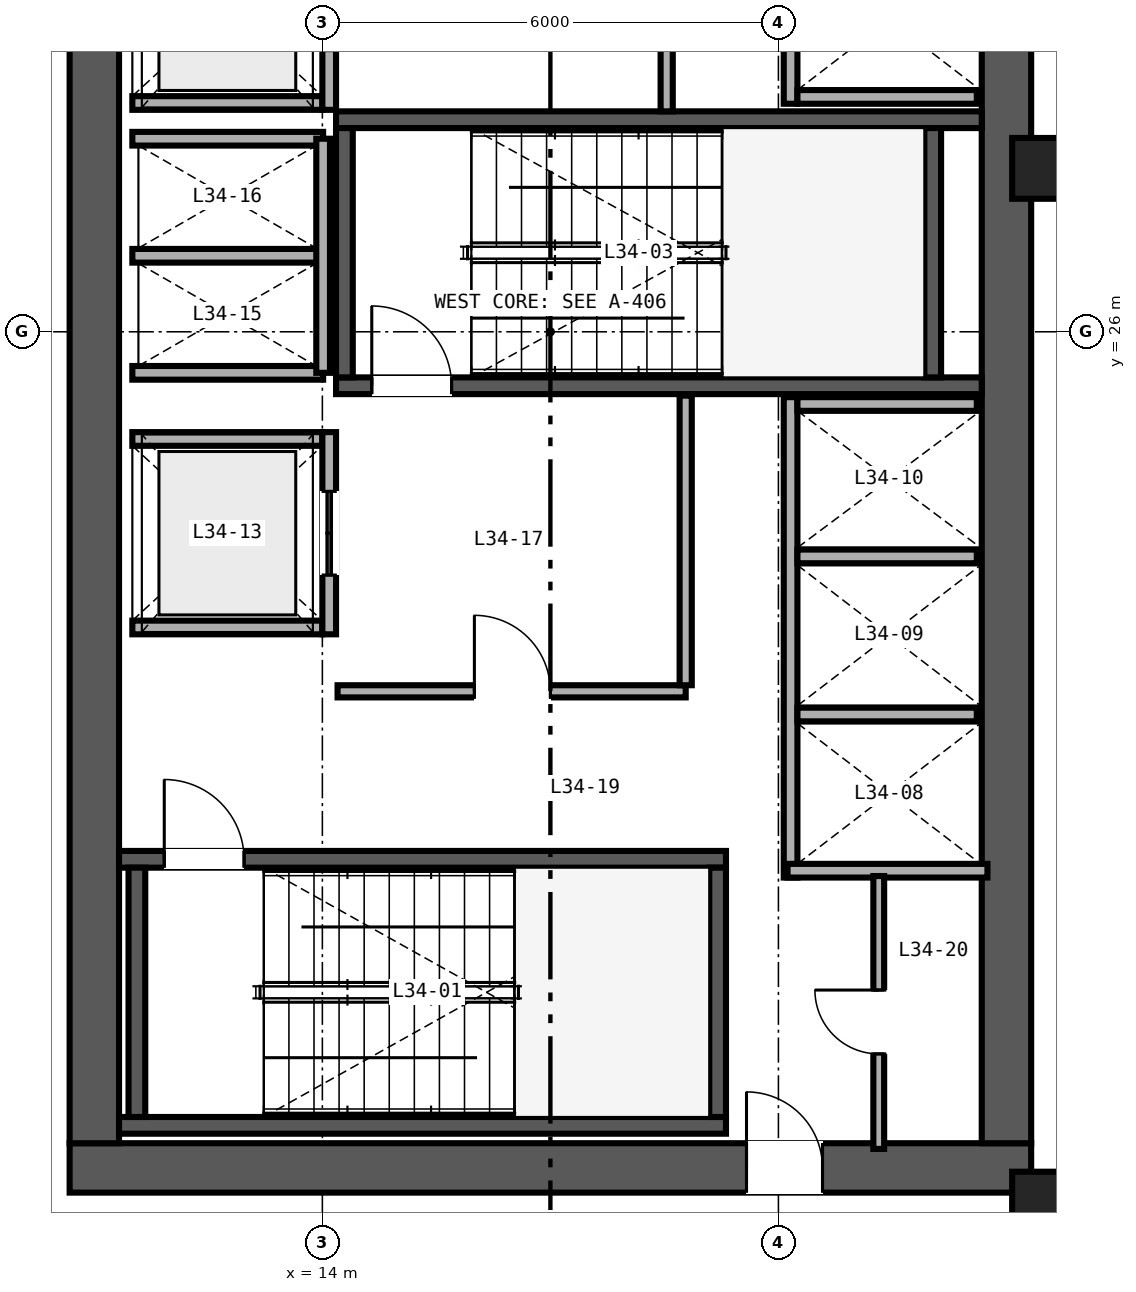
"""IFC4 building model, lengths in metres.
Left out: names, types, materials, properties, quantities, classifications, styles, units other than length and angle.
Written with IfcOpenShell. Run it as: python <this file> out.ifc"""

import sys

from ifc_helpers import new_model, si_unit, direction, frame, frame_2d, origin, origin_2d, place, context, subcontext, project, spatial, rectangle, hollow_rectangle, extrude, source, transform, mapped, element, fill, save


model = new_model("IFC4")
c1 = context("Model", 3, precision=1e-05, world=origin(), true_north=direction((0.0, 1.0)))
c2 = subcontext(c1, "Body", "Model", "MODEL_VIEW")
j1 = project(units=[si_unit("LENGTHUNIT", "METRE"), si_unit("PLANEANGLEUNIT", "RADIAN")], contexts=[c1])
p1 = place(None, origin())
s1 = spatial("IfcSite", under=j1, at=p1, CompositionType="ELEMENT")
p2 = place(p1, origin())
s2 = spatial("IfcBuilding", under=s1, at=p2, CompositionType="ELEMENT")
p3 = place(p2, frame((0.0, 0.0, 136.8)))
s3 = spatial("IfcBuildingStorey", under=s2, at=p3, CompositionType="ELEMENT", Elevation=136.8)
p4 = place(p3, frame((10.675, 15.0, 0.0), z_axis=(0.0, 0.0, 1.0), x_axis=(1.0, 0.0, 0.0)))
e1 = element("IfcWall", 1, at=p4, inside=s3, PredefinedType="SHEAR", context=c2, shape_type="SweptSolid", body=[
    extrude(rectangle(XDim=12.65, YDim=0.65, at=frame_2d((6.325, 0.0))), origin(), (0.0, 0.0, 1.0), 3.36),
])
p5 = place(p4, frame((8.905, 0.0, 0.0)))
e2 = element("IfcOpeningElement", 2, at=p5, cuts=e1, PredefinedType="OPENING", context=c2, shape_type="SweptSolid", body=[
    extrude(rectangle(XDim=1.0, YDim=2.15, at=frame_2d((0.5, 1.075))), frame((0.0, 0.335, 0.0), z_axis=(0.0, -1.0, 0.0), x_axis=(1.0, 0.0, 0.0)), (0.0, 0.0, 1.0), 0.67),
])
for number, where, z_axis, x_axis in (
    (3, (11.0, 15.325, 0.0), (0.0, 0.0, 1.0), (0.0, 1.0, 0.0)),
    (4, (23.0, 15.325, 0.0), (0.0, 0.0, 1.0), (0.0, 1.0, 0.0)),
):
    element("IfcWall", number, at=place(p3, frame(where, z_axis=z_axis, x_axis=x_axis)), inside=s3, PredefinedType="SHEAR", context=c2, shape_type="SweptSolid", body=[
        extrude(rectangle(XDim=21.35, YDim=0.65, at=frame_2d((10.675, 0.0))), origin(), (0.0, 0.0, 1.0), 3.36),
    ])
p6 = place(p3, frame((11.325, 15.56, 0.0), z_axis=(0.0, 0.0, 1.0), x_axis=(1.0, 0.0, 0.0)))
e5 = element("IfcWall", 5, at=p6, inside=s3, PredefinedType="SHEAR", context=c2, shape_type="SweptSolid", body=[
    extrude(rectangle(XDim=7.985, YDim=0.22, at=frame_2d((3.993, 0.0))), origin(), (0.0, 0.0, 1.0), 3.4),
])
p7 = place(p3, frame((11.325, 19.06, 0.0), z_axis=(0.0, 0.0, 1.0), x_axis=(1.0, 0.0, 0.0)))
e6 = element("IfcWall", 6, at=p7, inside=s3, PredefinedType="SHEAR", context=c2, shape_type="SweptSolid", body=[
    extrude(rectangle(XDim=7.985, YDim=0.22, at=frame_2d((3.993, 0.0))), origin(), (0.0, 0.0, 1.0), 3.4),
])
p8 = place(p7, frame((0.595, 0.0, 0.0)))
e7 = element("IfcOpeningElement", 7, at=p8, cuts=e6, PredefinedType="OPENING", context=c2, shape_type="SweptSolid", body=[
    extrude(rectangle(XDim=1.05, YDim=2.15, at=frame_2d((0.525, 1.075))), frame((0.0, 0.12, 0.0), z_axis=(0.0, -1.0, 0.0), x_axis=(1.0, 0.0, 0.0)), (0.0, 0.0, 1.0), 0.24),
])
for number, where, z_axis, x_axis in (
    (8, (11.56, 15.67, 0.0), (0.0, 0.0, 1.0), (0.0, 1.0, 0.0)),
    (9, (19.2, 15.67, 0.0), (0.0, 0.0, 1.0), (0.0, 1.0, 0.0)),
):
    element("IfcWall", number, at=place(p3, frame(where, z_axis=z_axis, x_axis=x_axis)), inside=s3, PredefinedType="SHEAR", context=c2, shape_type="SweptSolid", body=[
        extrude(rectangle(XDim=3.28, YDim=0.22, at=frame_2d((1.64, 0.0))), origin(), (0.0, 0.0, 1.0), 3.4),
    ])
p9 = place(p3, frame((14.18, 25.29, 0.0), z_axis=(0.0, 0.0, 1.0), x_axis=(1.0, 0.0, 0.0)))
e10 = element("IfcWall", 10, at=p9, inside=s3, PredefinedType="SHEAR", context=c2, shape_type="SweptSolid", body=[
    extrude(rectangle(XDim=8.495, YDim=0.22, at=frame_2d((4.248, 0.0))), origin(), (0.0, 0.0, 1.0), 3.4),
])
p10 = place(p9, frame((0.47, 0.0, 0.0)))
e11 = element("IfcOpeningElement", 11, at=p10, cuts=e10, PredefinedType="OPENING", context=c2, shape_type="SweptSolid", body=[
    extrude(rectangle(XDim=1.05, YDim=2.15, at=frame_2d((0.525, 1.075))), frame((0.0, 0.12, 0.0), z_axis=(0.0, -1.0, 0.0), x_axis=(1.0, 0.0, 0.0)), (0.0, 0.0, 1.0), 0.24),
])
p11 = place(p3, frame((14.18, 28.79, 0.0), z_axis=(0.0, 0.0, 1.0), x_axis=(1.0, 0.0, 0.0)))
e12 = element("IfcWall", 12, at=p11, inside=s3, PredefinedType="SHEAR", context=c2, shape_type="SweptSolid", body=[
    extrude(rectangle(XDim=8.495, YDim=0.22, at=frame_2d((4.248, 0.0))), origin(), (0.0, 0.0, 1.0), 3.4),
])
for number, where, z_axis, x_axis in (
    (13, (14.29, 25.4, 0.0), (0.0, 0.0, 1.0), (0.0, 1.0, 0.0)),
    (14, (22.03, 25.4, 0.0), (0.0, 0.0, 1.0), (0.0, 1.0, 0.0)),
):
    element("IfcWall", number, at=place(p3, frame(where, z_axis=z_axis, x_axis=x_axis)), inside=s3, PredefinedType="SHEAR", context=c2, shape_type="SweptSolid", body=[
        extrude(rectangle(XDim=3.28, YDim=0.22, at=frame_2d((1.64, 0.0))), origin(), (0.0, 0.0, 1.0), 3.4),
    ])
m1 = source(origin(), c2, "Body", "SweptSolid", [
    extrude(hollow_rectangle(XDim=0.85, YDim=0.8, WallThickness=0.032, at=origin_2d()), origin(), (0.0, 0.0, 1.0), 3.36),
])
for number, where, z_axis, x_axis in (
    (15, (23.5, 14.55, 0.0), (0.0, 0.0, 1.0), (1.0, 0.0, 0.0)),
    (16, (23.5, 28.15, 0.0), (0.0, 0.0, 1.0), (1.0, 0.0, 0.0)),
):
    element("IfcColumn", number, at=place(p3, frame(where, z_axis=z_axis, x_axis=x_axis)), inside=s3, PredefinedType="COLUMN", context=c2, shape_type="MappedRepresentation", body=[
        mapped(m1, transform((0.0, 0.0, 0.0), scale=1.0)),
    ])
p12 = place(p3, frame((20.16, 18.82, 0.0), z_axis=(0.0, 0.0, 1.0), x_axis=(0.0, 1.0, 0.0)))
e17 = element("IfcWall", 17, at=p12, inside=s3, PredefinedType="SOLIDWALL", context=c2, shape_type="SweptSolid", body=[
    extrude(rectangle(XDim=6.32, YDim=0.18, at=frame_2d((3.16, 0.0))), origin(), (0.0, 0.0, 1.0), 2.36),
])
p13 = place(p3, frame((20.12, 18.91, 0.0), z_axis=(0.0, 0.0, 1.0), x_axis=(1.0, 0.0, 0.0)))
e18 = element("IfcWall", 18, at=p13, inside=s3, PredefinedType="SOLIDWALL", context=c2, shape_type="SweptSolid", body=[
    extrude(rectangle(XDim=2.63, YDim=0.18, at=frame_2d((1.315, 0.0))), origin(), (0.0, 0.0, 1.0), 3.36),
])
p14 = place(p3, frame((20.25, 25.05, 0.0), z_axis=(0.0, 0.0, 1.0), x_axis=(1.0, 0.0, 0.0)))
e19 = element("IfcWall", 19, at=p14, inside=s3, PredefinedType="SOLIDWALL", context=c2, shape_type="SweptSolid", body=[
    extrude(rectangle(XDim=2.36, YDim=0.18, at=frame_2d((1.18, 0.0))), origin(), (0.0, 0.0, 1.0), 3.36),
])
p15 = place(p3, frame((20.25, 20.965, 0.0), z_axis=(0.0, 0.0, 1.0), x_axis=(1.0, 0.0, 0.0)))
e20 = element("IfcWall", 20, at=p15, inside=s3, PredefinedType="SOLIDWALL", context=c2, shape_type="SweptSolid", body=[
    extrude(rectangle(XDim=2.36, YDim=0.18, at=frame_2d((1.18, 0.0))), origin(), (0.0, 0.0, 1.0), 2.36),
])
p16 = place(p3, frame((20.25, 23.045, 0.0), z_axis=(0.0, 0.0, 1.0), x_axis=(1.0, 0.0, 0.0)))
e21 = element("IfcWall", 21, at=p16, inside=s3, PredefinedType="SOLIDWALL", context=c2, shape_type="SweptSolid", body=[
    extrude(rectangle(XDim=2.36, YDim=0.18, at=frame_2d((1.18, 0.0))), origin(), (0.0, 0.0, 1.0), 3.36),
])
p17 = place(p3, frame((20.16, 29.0, 0.0), z_axis=(0.0, 0.0, 1.0), x_axis=(0.0, 1.0, 0.0)))
e22 = element("IfcWall", 22, at=p17, inside=s3, PredefinedType="SOLIDWALL", context=c2, shape_type="SweptSolid", body=[
    extrude(rectangle(XDim=4.29, YDim=0.18, at=frame_2d((2.145, 0.0))), origin(), (0.0, 0.0, 1.0), 3.36),
])
p18 = place(p3, frame((20.25, 29.09, 0.0), z_axis=(0.0, 0.0, 1.0), x_axis=(1.0, 0.0, 0.0)))
e23 = element("IfcWall", 23, at=p18, inside=s3, PredefinedType="SOLIDWALL", context=c2, shape_type="SweptSolid", body=[
    extrude(rectangle(XDim=2.36, YDim=0.18, at=frame_2d((1.18, 0.0))), origin(), (0.0, 0.0, 1.0), 3.36),
])
for number, where, z_axis, x_axis in (
    (24, (11.5, 22.11, 0.0), (0.0, 0.0, 1.0), (1.0, 0.0, 0.0)),
    (25, (11.5, 24.59, 0.0), (0.0, 0.0, 1.0), (1.0, 0.0, 0.0)),
):
    element("IfcWall", number, at=place(p3, frame(where, z_axis=z_axis, x_axis=x_axis)), inside=s3, PredefinedType="SOLIDWALL", context=c2, shape_type="SweptSolid", body=[
        extrude(rectangle(XDim=2.5, YDim=0.18, at=frame_2d((1.25, 0.0))), origin(), (0.0, 0.0, 1.0), 3.36),
    ])
p19 = place(p3, frame((14.09, 22.02, 0.0), z_axis=(0.0, 0.0, 1.0), x_axis=(0.0, 1.0, 0.0)))
e26 = element("IfcWall", 26, at=p19, inside=s3, PredefinedType="SOLIDWALL", context=c2, shape_type="SweptSolid", body=[
    extrude(rectangle(XDim=2.66, YDim=0.18, at=frame_2d((1.33, 0.0))), origin(), (0.0, 0.0, 1.0), 3.36),
])
p20 = place(p19, frame((0.78, 0.0, 0.0)))
e27 = element("IfcOpeningElement", 27, at=p20, cuts=e26, PredefinedType="OPENING", context=c2, shape_type="SweptSolid", body=[
    extrude(rectangle(XDim=1.1, YDim=2.2, at=frame_2d((0.55, 1.1))), frame((0.0, 0.1, 0.0), z_axis=(0.0, -1.0, 0.0), x_axis=(1.0, 0.0, 0.0)), (0.0, 0.0, 1.0), 0.2),
])
p21 = place(p3, frame((11.5, 29.01, 0.0), z_axis=(0.0, 0.0, 1.0), x_axis=(1.0, 0.0, 0.0)))
e28 = element("IfcWall", 28, at=p21, inside=s3, PredefinedType="SOLIDWALL", context=c2, shape_type="SweptSolid", body=[
    extrude(rectangle(XDim=2.5, YDim=0.18, at=frame_2d((1.25, 0.0))), origin(), (0.0, 0.0, 1.0), 3.36),
])
p22 = place(p3, frame((14.09, 28.92, 0.0), z_axis=(0.0, 0.0, 1.0), x_axis=(0.0, 1.0, 0.0)))
e29 = element("IfcWall", 29, at=p22, inside=s3, PredefinedType="SOLIDWALL", context=c2, shape_type="SweptSolid", body=[
    extrude(rectangle(XDim=2.66, YDim=0.18, at=frame_2d((1.33, 0.0))), origin(), (0.0, 0.0, 1.0), 3.36),
])
p23 = place(p22, frame((0.78, 0.0, 0.0)))
e30 = element("IfcOpeningElement", 30, at=p23, cuts=e29, PredefinedType="OPENING", context=c2, shape_type="SweptSolid", body=[
    extrude(rectangle(XDim=1.1, YDim=2.2, at=frame_2d((0.55, 1.1))), frame((0.0, 0.1, 0.0), z_axis=(0.0, -1.0, 0.0), x_axis=(1.0, 0.0, 0.0)), (0.0, 0.0, 1.0), 0.2),
])
for number, where, z_axis, x_axis in (
    (31, (11.5, 25.46, 0.0), (0.0, 0.0, 1.0), (1.0, 0.0, 0.0)),
    (32, (11.5, 27.0, 0.0), (0.0, 0.0, 1.0), (1.0, 0.0, 0.0)),
    (33, (11.5, 28.54, 0.0), (0.0, 0.0, 1.0), (1.0, 0.0, 0.0)),
):
    element("IfcWall", number, at=place(p3, frame(where, z_axis=z_axis, x_axis=x_axis)), inside=s3, PredefinedType="SOLIDWALL", context=c2, shape_type="SweptSolid", body=[
        extrude(rectangle(XDim=2.51, YDim=0.18, at=frame_2d((1.255, 0.0))), origin(), (0.0, 0.0, 1.0), 3.36),
    ])
p24 = place(p3, frame((14.01, 25.46, 0.0), z_axis=(0.0, 0.0, 1.0), x_axis=(0.0, 1.0, 0.0)))
e34 = element("IfcWall", 34, at=p24, inside=s3, PredefinedType="SOLIDWALL", context=c2, shape_type="SweptSolid", body=[
    extrude(rectangle(XDim=3.08, YDim=0.18, at=frame_2d((1.54, 0.0))), origin(), (0.0, 0.0, 1.0), 3.36),
])
p25 = place(p3, frame((14.2, 21.27, 0.0), z_axis=(0.0, 0.0, 1.0), x_axis=(1.0, 0.0, 0.0)))
e35 = element("IfcWall", 35, at=p25, inside=s3, PredefinedType="PARTITIONING", context=c2, shape_type="SweptSolid", body=[
    extrude(rectangle(XDim=4.58, YDim=0.16, at=frame_2d((2.29, 0.0))), origin(), (0.0, 0.0, 1.0), 3.36),
])
p26 = place(p25, frame((1.8, 0.0, 0.0)))
e36 = element("IfcOpeningElement", 36, at=p26, cuts=e35, PredefinedType="OPENING", context=c2, shape_type="SweptSolid", body=[
    extrude(rectangle(XDim=1.0, YDim=2.15, at=frame_2d((0.5, 1.075))), frame((0.0, 0.09, 0.0), z_axis=(0.0, -1.0, 0.0), x_axis=(1.0, 0.0, 0.0)), (0.0, 0.0, 1.0), 0.18),
])
p27 = place(p3, frame((18.78, 21.35, 0.0), z_axis=(0.0, 0.0, 1.0), x_axis=(0.0, 1.0, 0.0)))
e37 = element("IfcWall", 37, at=p27, inside=s3, PredefinedType="PARTITIONING", context=c2, shape_type="SweptSolid", body=[
    extrude(rectangle(XDim=3.81, YDim=0.16, at=frame_2d((1.905, 0.0))), origin(), (0.0, 0.0, 1.0), 3.36),
])
p28 = place(p3, frame((18.53, 28.9, 0.0), z_axis=(0.0, 0.0, 1.0), x_axis=(0.0, 1.0, 0.0)))
e38 = element("IfcWall", 38, at=p28, inside=s3, PredefinedType="PARTITIONING", context=c2, shape_type="SweptSolid", body=[
    extrude(rectangle(XDim=3.9, YDim=0.16, at=frame_2d((1.95, 0.0))), origin(), (0.0, 0.0, 1.0), 3.36),
])
p29 = place(p28, frame((1.5, 0.0, 0.0)))
e39 = element("IfcOpeningElement", 39, at=p29, cuts=e38, PredefinedType="OPENING", context=c2, shape_type="SweptSolid", body=[
    extrude(rectangle(XDim=1.0, YDim=2.15, at=frame_2d((0.5, 1.075))), frame((0.0, 0.09, 0.0), z_axis=(0.0, -1.0, 0.0), x_axis=(1.0, 0.0, 0.0)), (0.0, 0.0, 1.0), 0.18),
])
p30 = place(p3, frame((21.32, 15.25, 0.0), z_axis=(0.0, 0.0, 1.0), x_axis=(0.0, 1.0, 0.0)))
e40 = element("IfcWall", 40, at=p30, inside=s3, PredefinedType="PARTITIONING", context=c2, shape_type="SweptSolid", body=[
    extrude(rectangle(XDim=3.59, YDim=0.142, at=frame_2d((1.795, 0.0))), origin(), (0.0, 0.0, 1.0), 3.36),
])
p31 = place(p30, frame((1.25, 0.0, 0.0)))
e41 = element("IfcOpeningElement", 41, at=p31, cuts=e40, PredefinedType="OPENING", context=c2, shape_type="SweptSolid", body=[
    extrude(rectangle(XDim=0.84, YDim=2.1, at=frame_2d((0.42, 1.05))), frame((0.0, 0.081, 0.0), z_axis=(0.0, -1.0, 0.0), x_axis=(1.0, 0.0, 0.0)), (0.0, 0.0, 1.0), 0.162),
])
m2 = source(origin(), c2, "Body", "SweptSolid", [
    extrude(rectangle(XDim=1.05, YDim=2.15, at=frame_2d((0.525, 1.075))), frame((0.0, 0.025, 0.0), z_axis=(0.0, -1.0, 0.0), x_axis=(1.0, 0.0, 0.0)), (0.0, 0.0, 1.0), 0.05),
])
p32 = place(p8, origin())
e42 = element("IfcDoor", 42, at=p32, inside=s3, OperationType="SINGLE_SWING_LEFT", PredefinedType="DOOR", context=c2, shape_type="MappedRepresentation", body=[
    mapped(m2, transform((0.0, 0.0, 0.0), scale=1.0)),
])
fill(e7, e42)
p33 = place(p10, origin())
e43 = element("IfcDoor", 43, at=p33, inside=s3, OperationType="SINGLE_SWING_LEFT", PredefinedType="DOOR", context=c2, shape_type="MappedRepresentation", body=[
    mapped(m2, transform((0.0, 0.0, 0.0), scale=1.0)),
])
fill(e11, e43)
m3 = source(origin(), c2, "Body", "SweptSolid", [
    extrude(rectangle(XDim=1.1, YDim=2.2, at=frame_2d((0.55, 1.1))), frame((0.0, 0.025, 0.0), z_axis=(0.0, -1.0, 0.0), x_axis=(1.0, 0.0, 0.0)), (0.0, 0.0, 1.0), 0.05),
])
p34 = place(p20, origin())
e44 = element("IfcDoor", 44, at=p34, inside=s3, OperationType="DOUBLE_DOOR_SLIDING", PredefinedType="DOOR", context=c2, shape_type="MappedRepresentation", body=[
    mapped(m3, transform((0.0, 0.0, 0.0), scale=1.0)),
])
fill(e27, e44)
m4 = source(origin(), c2, "Body", "SweptSolid", [
    extrude(rectangle(XDim=1.0, YDim=2.15, at=frame_2d((0.5, 1.075))), frame((0.0, 0.025, 0.0), z_axis=(0.0, -1.0, 0.0), x_axis=(1.0, 0.0, 0.0)), (0.0, 0.0, 1.0), 0.05),
])
p35 = place(p26, origin())
e45 = element("IfcDoor", 45, at=p35, inside=s3, OperationType="SINGLE_SWING_LEFT", PredefinedType="DOOR", context=c2, shape_type="MappedRepresentation", body=[
    mapped(m4, transform((0.0, 0.0, 0.0), scale=1.0)),
])
fill(e36, e45)
m5 = source(origin(), c2, "Body", "SweptSolid", [
    extrude(rectangle(XDim=0.84, YDim=2.1, at=frame_2d((0.42, 1.05))), frame((0.0, 0.025, 0.0), z_axis=(0.0, -1.0, 0.0), x_axis=(1.0, 0.0, 0.0)), (0.0, 0.0, 1.0), 0.05),
])
p36 = place(p31, origin())
e46 = element("IfcDoor", 46, at=p36, inside=s3, OperationType="SINGLE_SWING_RIGHT", PredefinedType="DOOR", context=c2, shape_type="MappedRepresentation", body=[
    mapped(m5, transform((0.0, 0.0, 0.0), scale=1.0)),
])
fill(e41, e46)
p37 = place(p5, origin())
e47 = element("IfcDoor", 47, at=p37, inside=s3, OperationType="SINGLE_SWING_LEFT", PredefinedType="DOOR", context=c2, shape_type="MappedRepresentation", body=[
    mapped(m4, transform((0.0, 0.0, 0.0), scale=1.0)),
])
fill(e2, e47)
save(model, sys.argv[1])
